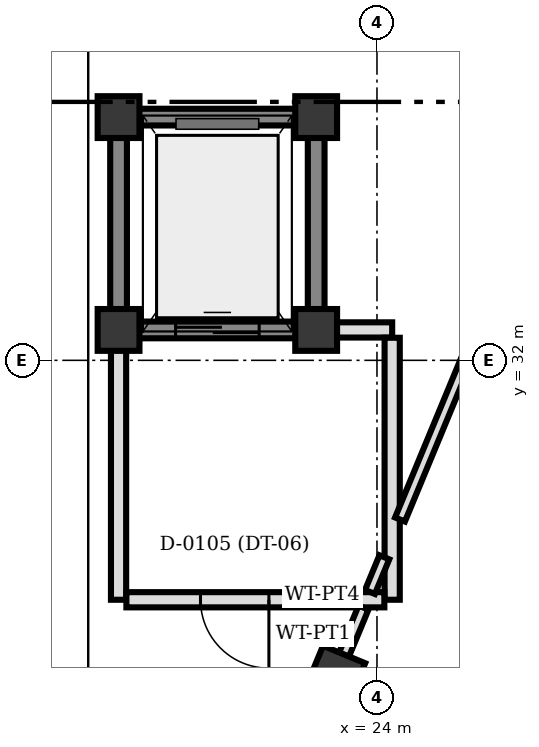
"""IFC4 building model, lengths in metres.
Left out: names, types, materials, properties, quantities, classifications, styles, units other than length and angle.
Written with IfcOpenShell. Run it as: python <this file> out.ifc"""

import sys

from ifc_helpers import new_model, si_unit, direction, frame, frame_2d, origin, origin_2d, place, context, subcontext, project, spatial, rectangle, extrude, element, fill, save


model = new_model("IFC4")
c1 = context("Model", 3, precision=1e-05, world=origin(), true_north=direction((0.0, 1.0)))
c2 = subcontext(c1, "Body", "Model", "MODEL_VIEW")
j1 = project(units=[si_unit("LENGTHUNIT", "METRE"), si_unit("PLANEANGLEUNIT", "RADIAN")], contexts=[c1])
p1 = place(None, origin())
s1 = spatial("IfcSite", under=j1, at=p1, CompositionType="ELEMENT")
p2 = place(p1, origin())
s2 = spatial("IfcBuilding", under=s1, at=p2, CompositionType="ELEMENT")
p3 = place(p2, origin())
s3 = spatial("IfcBuildingStorey", under=s2, at=p3, CompositionType="ELEMENT", Elevation=0.0)
for number, where, z_axis, x_axis in (
    (1, (20.6, 32.4, 0.0), (0.0, 0.0, 1.0), (1.0, 0.0, 0.0)),
    (2, (23.2, 32.4, 0.0), (0.0, 0.0, 1.0), (1.0, 0.0, 0.0)),
    (3, (23.2, 35.2, 0.0), (0.0, 0.0, 1.0), (1.0, 0.0, 0.0)),
    (4, (20.6, 35.2, 0.0), (0.0, 0.0, 1.0), (1.0, 0.0, 0.0)),
):
    element("IfcColumn", number, at=place(p3, frame(where, z_axis=z_axis, x_axis=x_axis)), inside=s3, PredefinedType="COLUMN", context=c2, shape_type="SweptSolid", body=[
        extrude(rectangle(XDim=0.55, YDim=0.55, at=origin_2d()), origin(), (0.0, 0.0, 1.0), 4.5),
    ])
p4 = place(p3, frame((23.453, 27.853, 0.0), z_axis=(0.0, 0.0, 1.0), x_axis=(0.382683432365, 0.923879532511, 0.0)))
e5 = element("IfcColumn", 5, at=p4, inside=s3, PredefinedType="COLUMN", context=c2, shape_type="SweptSolid", body=[
    extrude(rectangle(XDim=0.6, YDim=0.6, at=origin_2d()), origin(), (0.0, 0.0, 1.0), 4.5),
])
p5 = place(p3, frame((20.867, 32.4, 0.0), z_axis=(0.0, 0.0, 1.0), x_axis=(1.0, 0.0, 0.0)))
e6 = element("IfcWall", 6, at=p5, inside=s3, PredefinedType="SHEAR", context=c2, shape_type="SweptSolid", body=[
    extrude(rectangle(XDim=2.066, YDim=0.22, at=frame_2d((1.033, 0.0))), origin(), (0.0, 0.0, 1.0), 4.24),
])
p6 = place(p5, frame((0.483, 0.0, 0.0)))
e7 = element("IfcOpeningElement", 7, at=p6, cuts=e6, PredefinedType="OPENING", context=c2, shape_type="SweptSolid", body=[
    extrude(rectangle(XDim=1.1, YDim=2.15, at=frame_2d((0.55, 1.075))), frame((0.0, 0.12, 0.0), z_axis=(0.0, -1.0, 0.0), x_axis=(1.0, 0.0, 0.0)), (0.0, 0.0, 1.0), 0.24),
])
p7 = place(p3, frame((23.2, 32.667, 0.0), z_axis=(0.0, 0.0, 1.0), x_axis=(0.0, 1.0, 0.0)))
e8 = element("IfcWall", 8, at=p7, inside=s3, PredefinedType="SHEAR", context=c2, shape_type="SweptSolid", body=[
    extrude(rectangle(XDim=2.266, YDim=0.22, at=frame_2d((1.133, 0.0))), origin(), (0.0, 0.0, 1.0), 4.24),
])
p8 = place(p3, frame((22.933, 35.2, 0.0), z_axis=(0.0, 0.0, 1.0), x_axis=(-1.0, 0.0, 0.0)))
e9 = element("IfcWall", 9, at=p8, inside=s3, PredefinedType="SHEAR", context=c2, shape_type="SweptSolid", body=[
    extrude(rectangle(XDim=2.066, YDim=0.22, at=frame_2d((1.033, 0.0))), origin(), (0.0, 0.0, 1.0), 4.24),
])
p9 = place(p3, frame((20.6, 34.933, 0.0), z_axis=(0.0, 0.0, 1.0), x_axis=(0.0, -1.0, 0.0)))
e10 = element("IfcWall", 10, at=p9, inside=s3, PredefinedType="SHEAR", context=c2, shape_type="SweptSolid", body=[
    extrude(rectangle(XDim=2.266, YDim=0.22, at=frame_2d((1.133, 0.0))), origin(), (0.0, 0.0, 1.0), 4.24),
])
p10 = place(p3, frame((23.467, 32.4, 0.0), z_axis=(0.0, 0.0, 1.0), x_axis=(1.0, 0.0, 0.0)))
e11 = element("IfcWall", 11, at=p10, inside=s3, PredefinedType="PARTITIONING", context=c2, shape_type="SweptSolid", body=[
    extrude(rectangle(XDim=0.733, YDim=0.2, at=frame_2d((0.366, 0.0))), origin(), (0.0, 0.0, 1.0), 4.2),
])
p11 = place(p3, frame((20.6, 28.85, 0.0), z_axis=(0.0, 0.0, 1.0), x_axis=(0.0, 1.0, 0.0)))
e12 = element("IfcWall", 12, at=p11, inside=s3, PredefinedType="PARTITIONING", context=c2, shape_type="SweptSolid", body=[
    extrude(rectangle(XDim=3.283, YDim=0.2, at=frame_2d((1.642, 0.0))), origin(), (0.0, 0.0, 1.0), 4.2),
])
p12 = place(p3, frame((24.2, 28.85, 0.0), z_axis=(0.0, 0.0, 1.0), x_axis=(0.0, 1.0, 0.0)))
e13 = element("IfcWall", 13, at=p12, inside=s3, PredefinedType="PARTITIONING", context=c2, shape_type="SweptSolid", body=[
    extrude(rectangle(XDim=3.447, YDim=0.2, at=frame_2d((1.724, 0.0))), origin(), (0.0, 0.0, 1.0), 3.552),
])
p13 = place(p3, frame((24.097, 28.85, 0.0), z_axis=(0.0, 0.0, 1.0), x_axis=(-1.0, 0.0, 0.0)))
e14 = element("IfcWall", 14, at=p13, inside=s3, PredefinedType="PARTITIONING", context=c2, shape_type="SweptSolid", body=[
    extrude(rectangle(XDim=3.394, YDim=0.2, at=frame_2d((1.697, 0.0))), origin(), (0.0, 0.0, 1.0), 3.552),
])
p14 = place(p13, frame((1.519, 0.0, 0.0)))
e15 = element("IfcOpeningElement", 15, at=p14, cuts=e14, PredefinedType="OPENING", context=c2, shape_type="SweptSolid", body=[
    extrude(rectangle(XDim=0.9, YDim=2.2, at=frame_2d((0.45, 1.1))), frame((0.0, 0.11, 0.0), z_axis=(0.0, -1.0, 0.0), x_axis=(1.0, 0.0, 0.0)), (0.0, 0.0, 1.0), 0.22),
])
p15 = place(p3, frame((23.564, 28.123, 0.0), z_axis=(0.0, 0.0, 1.0), x_axis=(0.383383487336, 0.923589249417, 0.0)))
e16 = element("IfcWall", 16, at=p15, inside=s3, PredefinedType="PARTITIONING", context=c2, shape_type="SweptSolid", body=[
    extrude(rectangle(XDim=0.676, YDim=0.14, at=frame_2d((0.338, 0.0))), origin(), (0.0, 0.0, 1.0), 3.552),
])
p16 = place(p3, frame((23.908, 28.953, 0.0), z_axis=(0.0, 0.0, 1.0), x_axis=(0.3827885685, 0.92383597669, 0.0)))
e17 = element("IfcWall", 17, at=p16, inside=s3, PredefinedType="PARTITIONING", context=c2, shape_type="SweptSolid", body=[
    extrude(rectangle(XDim=0.494, YDim=0.14, at=frame_2d((0.247, 0.0))), origin(), (0.0, 0.0, 1.0), 3.552),
])
p17 = place(p3, frame((24.303, 29.906, 0.0), z_axis=(0.0, 0.0, 1.0), x_axis=(0.382744474407, 0.923854245707, 0.0)))
e18 = element("IfcWall", 18, at=p17, inside=s3, PredefinedType="PARTITIONING", context=c2, shape_type="SweptSolid", body=[
    extrude(rectangle(XDim=6.461, YDim=0.14, at=frame_2d((3.23, 0.0))), origin(), (0.0, 0.0, 1.0), 3.552),
])
p18 = place(p6, origin())
e19 = element("IfcDoor", 19, at=p18, inside=s3, OperationType="DOUBLE_DOOR_SLIDING", PredefinedType="DOOR", context=c2, shape_type="SweptSolid", body=[
    extrude(rectangle(XDim=1.1, YDim=2.15, at=frame_2d((0.55, 1.075))), frame((0.0, 0.025, 0.0), z_axis=(0.0, -1.0, 0.0), x_axis=(1.0, 0.0, 0.0)), (0.0, 0.0, 1.0), 0.05),
])
fill(e7, e19)
p19 = place(p14, origin())
e20 = element("IfcDoor", 20, at=p19, inside=s3, OperationType="SINGLE_SWING_LEFT", PredefinedType="DOOR", context=c2, shape_type="SweptSolid", body=[
    extrude(rectangle(XDim=0.9, YDim=2.2, at=frame_2d((0.45, 1.1))), frame((0.0, 0.025, 0.0), z_axis=(0.0, -1.0, 0.0), x_axis=(1.0, 0.0, 0.0)), (0.0, 0.0, 1.0), 0.05),
])
fill(e15, e20)
save(model, sys.argv[1])
